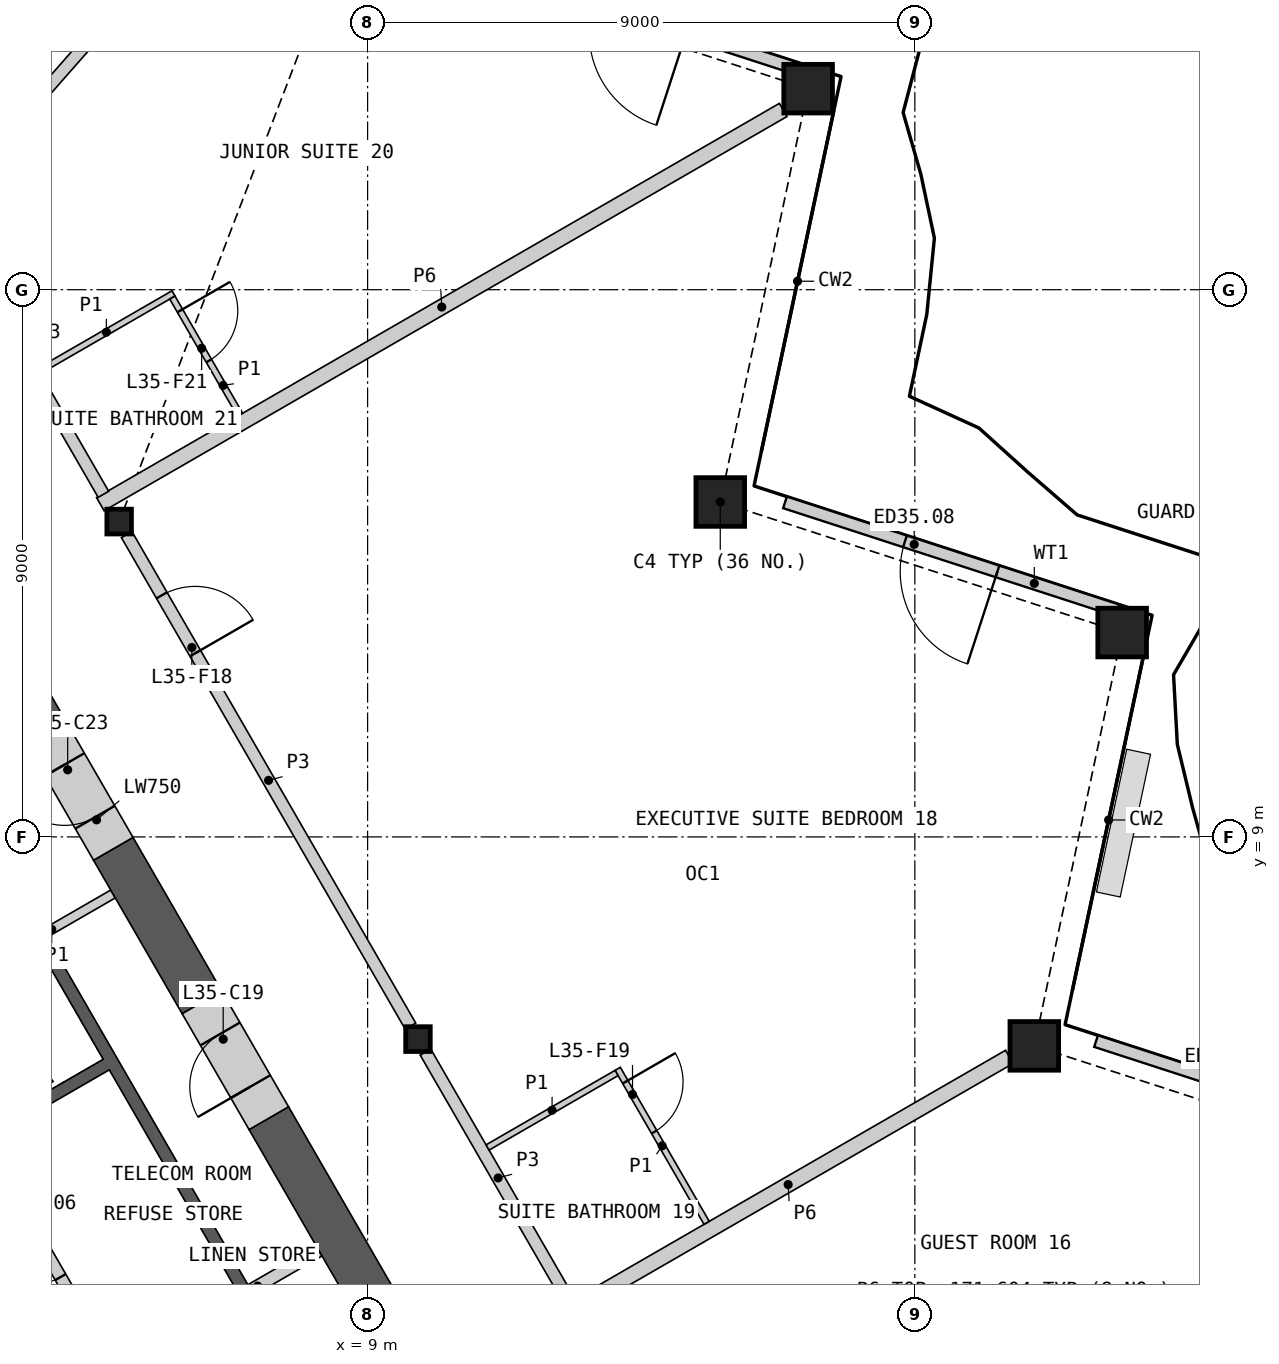
"""IFC4 building model, lengths in metres.
Left out: names, types, materials, properties, quantities, classifications, styles, units other than length and angle.
Written with IfcOpenShell. Run it as: python <this file> out.ifc"""

import sys

from ifc_helpers import new_model, si_unit, direction, frame, frame_2d, origin, origin_2d, place, context, subcontext, project, spatial, polyline, rectangle, hollow_rectangle, i_section, outline, extrude, element, fill, save


model = new_model("IFC4")
c1 = context("Model", 3, precision=1e-05, world=origin(), true_north=direction((0.0, 1.0)))
c2 = subcontext(c1, "Body", "Model", "MODEL_VIEW")
j1 = project(units=[si_unit("LENGTHUNIT", "METRE"), si_unit("PLANEANGLEUNIT", "RADIAN")], contexts=[c1])
p1 = place(None, origin())
s1 = spatial("IfcSite", under=j1, at=p1, CompositionType="ELEMENT")
p2 = place(p1, origin())
s2 = spatial("IfcBuilding", under=s1, at=p2, CompositionType="ELEMENT")
p3 = place(p2, frame((0.0, 0.0, 169.2)))
s3 = spatial("IfcBuildingStorey", under=s2, at=p3, CompositionType="ELEMENT", Elevation=169.2)
for number, where, z_axis, x_axis in (
    (1, (19.965, 5.563, 0.0), (0.0, 0.0, 1.0), (1.0, 0.0, 0.0)),
    (2, (21.409, 12.361, 0.0), (0.0, 0.0, 1.0), (1.0, 0.0, 0.0)),
    (3, (14.8, 14.508, 0.0), (0.0, 0.0, 1.0), (1.0, 0.0, 0.0)),
    (4, (16.245, 21.306, 0.0), (0.0, 0.0, 1.0), (1.0, 0.0, 0.0)),
):
    element("IfcColumn", number, at=place(p3, frame(where, z_axis=z_axis, x_axis=x_axis)), inside=s3, PredefinedType="COLUMN", context=c2, shape_type="SweptSolid", body=[
        extrude(hollow_rectangle(XDim=0.8, YDim=0.8, WallThickness=0.05, at=origin_2d()), origin(), (0.0, 0.0, 1.0), 3.6),
    ])
for number, where, z_axis, x_axis in (
    (5, (9.828, 5.675, 0.0), (0.0, 0.0, 1.0), (1.0, 0.0, 0.0)),
    (6, (4.914, 14.186, 0.0), (0.0, 0.0, 1.0), (1.0, 0.0, 0.0)),
):
    element("IfcColumn", number, at=place(p3, frame(where, z_axis=z_axis, x_axis=x_axis)), inside=s3, PredefinedType="COLUMN", context=c2, shape_type="SweptSolid", body=[
        extrude(i_section(OverallWidth=0.404, OverallDepth=0.407, WebThickness=0.027, FlangeThickness=0.044, at=origin_2d()), origin(), (0.0, 0.0, 1.0), 3.6),
    ])
p4 = place(p3, frame((26.447, 3.865, 0.0), z_axis=(0.0, 0.0, 1.0), x_axis=(-0.951043432761, 0.309057258453, 0.0)))
e7 = element("IfcWall", 7, at=p4, inside=s3, PredefinedType="SOLIDWALL", context=c2, shape_type="SweptSolid", body=[
    extrude(rectangle(XDim=5.748, YDim=0.2, at=frame_2d((2.874, 0.0))), origin(), (0.0, 0.0, 1.0), 2.701),
])
p5 = place(p4, frame((2.074, 0.0, 0.0)))
e8 = element("IfcOpeningElement", 8, at=p5, cuts=e7, PredefinedType="OPENING", context=c2, shape_type="SweptSolid", body=[
    extrude(rectangle(XDim=1.6, YDim=2.4, at=frame_2d((0.8, 1.2))), frame((0.0, 0.11, 0.0), z_axis=(0.0, -1.0, 0.0), x_axis=(1.0, 0.0, 0.0)), (0.0, 0.0, 1.0), 0.22),
])
p6 = place(p3, frame((21.331, 12.726, 0.0), z_axis=(0.0, 0.0, 1.0), x_axis=(-0.95105997304, 0.309006355405, 0.0)))
e9 = element("IfcWall", 9, at=p6, inside=s3, PredefinedType="SOLIDWALL", context=c2, shape_type="SweptSolid", body=[
    extrude(rectangle(XDim=5.748, YDim=0.2, at=frame_2d((2.874, 0.0))), origin(), (0.0, 0.0, 1.0), 2.701),
])
p7 = place(p6, frame((2.074, 0.0, 0.0)))
e10 = element("IfcOpeningElement", 10, at=p7, cuts=e9, PredefinedType="OPENING", context=c2, shape_type="SweptSolid", body=[
    extrude(rectangle(XDim=1.6, YDim=2.4, at=frame_2d((0.8, 1.2))), frame((0.0, 0.11, 0.0), z_axis=(0.0, -1.0, 0.0), x_axis=(1.0, 0.0, 0.0)), (0.0, 0.0, 1.0), 0.22),
])
p8 = place(p3, frame((16.216, 21.586, 0.0), z_axis=(0.0, 0.0, 1.0), x_axis=(-0.95105997304, 0.309006355405, 0.0)))
e11 = element("IfcWall", 11, at=p8, inside=s3, PredefinedType="SOLIDWALL", context=c2, shape_type="SweptSolid", body=[
    extrude(rectangle(XDim=5.748, YDim=0.2, at=frame_2d((2.874, 0.0))), origin(), (0.0, 0.0, 1.0), 2.701),
])
p9 = place(p8, frame((2.074, 0.0, 0.0)))
e12 = element("IfcOpeningElement", 12, at=p9, cuts=e11, PredefinedType="OPENING", context=c2, shape_type="SweptSolid", body=[
    extrude(rectangle(XDim=1.6, YDim=2.4, at=frame_2d((0.8, 1.2))), frame((0.0, 0.11, 0.0), z_axis=(0.0, -1.0, 0.0), x_axis=(1.0, 0.0, 0.0)), (0.0, 0.0, 1.0), 0.22),
])
p10 = place(p3, origin())
e13 = element("IfcWall", 13, at=p10, inside=s3, PredefinedType="SHEAR", context=c2, shape_type="SweptSolid", body=[
    extrude(outline(polyline([(1.561, 6.097), (3.731, 7.35), (7.131, 1.461), (4.96, 0.208), (4.861, 0.381), (6.852, 1.531), (4.752, 5.169), (2.76, 4.019), (2.66, 4.192), (4.652, 5.342), (3.652, 7.074), (1.66, 5.924), (1.561, 6.097)])), origin(), (0.0, 0.0, 1.0), 3.25),
])
p11 = place(p3, frame((5.817, -1.476, 0.0), z_axis=(0.0, 0.0, 1.0), x_axis=(-0.500002616675, 0.866023893041, 0.0)))
e14 = element("IfcWall", 14, at=p11, inside=s3, PredefinedType="SOLIDWALL", context=c2, shape_type="SweptSolid", body=[
    extrude(rectangle(XDim=8.373, YDim=0.2, at=frame_2d((4.187, 0.0))), origin(), (0.0, 0.0, 1.0), 3.25),
])
p12 = place(p11, frame((0.437, 0.0, 0.0)))
e15 = element("IfcOpeningElement", 15, at=p12, cuts=e14, PredefinedType="OPENING", context=c2, shape_type="SweptSolid", body=[
    extrude(rectangle(XDim=0.9, YDim=2.1, at=frame_2d((0.45, 1.05))), frame((0.0, 0.11, 0.0), z_axis=(0.0, -1.0, 0.0), x_axis=(1.0, 0.0, 0.0)), (0.0, 0.0, 1.0), 0.22),
])
p13 = place(p11, frame((3.737, 0.0, 0.0)))
e16 = element("IfcOpeningElement", 16, at=p13, cuts=e14, PredefinedType="OPENING", context=c2, shape_type="SweptSolid", body=[
    extrude(rectangle(XDim=0.9, YDim=2.1, at=frame_2d((0.45, 1.05))), frame((0.0, 0.11, 0.0), z_axis=(0.0, -1.0, 0.0), x_axis=(1.0, 0.0, 0.0)), (0.0, 0.0, 1.0), 0.22),
])
p14 = place(p11, frame((6.937, 0.0, 0.0)))
e17 = element("IfcOpeningElement", 17, at=p14, cuts=e14, PredefinedType="OPENING", context=c2, shape_type="SweptSolid", body=[
    extrude(rectangle(XDim=1.1, YDim=2.1, at=frame_2d((0.55, 1.05))), frame((0.0, 0.11, 0.0), z_axis=(0.0, -1.0, 0.0), x_axis=(1.0, 0.0, 0.0)), (0.0, 0.0, 1.0), 0.22),
])
p15 = place(p3, frame((7.081, 1.548, 0.0), z_axis=(0.0, 0.0, 1.0), x_axis=(0.866003189247, 0.500038474733, 0.0)))
e18 = element("IfcWall", 18, at=p15, inside=s3, PredefinedType="SHEAR", context=c2, shape_type="SweptSolid", body=[
    extrude(rectangle(XDim=1.293, YDim=0.2, at=frame_2d((0.646, 0.0))), origin(), (0.0, 0.0, 1.0), 3.25),
])
p16 = place(p3, frame((3.693, 7.415, 0.0), z_axis=(0.0, 0.0, 1.0), x_axis=(0.866003189247, 0.500038474733, 0.0)))
e19 = element("IfcWall", 19, at=p16, inside=s3, PredefinedType="PARTITIONING", context=c2, shape_type="SweptSolid", body=[
    extrude(rectangle(XDim=1.293, YDim=0.15, at=frame_2d((0.646, 0.0))), origin(), (0.0, 0.0, 1.0), 3.25),
])
p17 = place(p3, frame((14.526, -8.011, 0.0), z_axis=(0.0, 0.0, 1.0), x_axis=(-0.499994855372, 0.866028374016, 0.0)))
e20 = element("IfcWall", 20, at=p17, inside=s3, PredefinedType="SHEAR", context=c2, shape_type="SweptSolid", body=[
    extrude(rectangle(XDim=14.301, YDim=0.75, at=frame_2d((7.15, 0.0))), origin(), (0.0, 0.0, 1.0), 3.25),
])
p18 = place(p3, frame((6.275, 6.279, 0.0), z_axis=(0.0, 0.0, 1.0), x_axis=(-0.500029273391, 0.866008502124, 0.0)))
e21 = element("IfcWall", 21, at=p18, inside=s3, PredefinedType="SHEAR", context=c2, shape_type="SweptSolid", body=[
    extrude(rectangle(XDim=2.916, YDim=0.75, at=frame_2d((1.458, 0.0))), origin(), (0.0, 0.0, 1.0), 3.25),
])
p19 = place(p3, frame((3.717, 10.709, 0.0), z_axis=(0.0, 0.0, 1.0), x_axis=(-0.500005599468, 0.866022170906, 0.0)))
e22 = element("IfcWall", 22, at=p19, inside=s3, PredefinedType="SHEAR", context=c2, shape_type="SweptSolid", body=[
    extrude(rectangle(XDim=2.662, YDim=0.75, at=frame_2d((1.331, 0.0))), origin(), (0.0, 0.0, 1.0), 3.25),
])
p20 = place(p3, frame((7.375, 4.374, 0.0), z_axis=(0.0, 0.0, 1.0), x_axis=(-0.499946605688, 0.86605622881, 0.0)))
e23 = element("IfcWall", 23, at=p20, inside=s3, PredefinedType="SHEAR", context=c2, shape_type="SweptSolid", body=[
    extrude(rectangle(XDim=2.2, YDim=0.75, at=frame_2d((1.1, 0.0))), origin(), (0.0, 0.0, 1.0), 3.25),
])
p21 = place(p20, frame((0.6, 0.0, 0.0)))
e24 = element("IfcOpeningElement", 24, at=p21, cuts=e23, PredefinedType="OPENING", context=c2, shape_type="SweptSolid", body=[
    extrude(rectangle(XDim=1.0, YDim=2.1, at=frame_2d((0.5, 1.05))), frame((0.0, 0.385, 0.0), z_axis=(0.0, -1.0, 0.0), x_axis=(1.0, 0.0, 0.0)), (0.0, 0.0, 1.0), 0.77),
])
p22 = place(p3, frame((4.817, 8.804, 0.0), z_axis=(0.0, 0.0, 1.0), x_axis=(-0.50002983664, 0.866008176907, 0.0)))
e25 = element("IfcWall", 25, at=p22, inside=s3, PredefinedType="SHEAR", context=c2, shape_type="SweptSolid", body=[
    extrude(rectangle(XDim=2.2, YDim=0.75, at=frame_2d((1.1, 0.0))), origin(), (0.0, 0.0, 1.0), 3.25),
])
p23 = place(p22, frame((0.6, 0.0, 0.0)))
e26 = element("IfcOpeningElement", 26, at=p23, cuts=e25, PredefinedType="OPENING", context=c2, shape_type="SweptSolid", body=[
    extrude(rectangle(XDim=1.0, YDim=2.1, at=frame_2d((0.5, 1.05))), frame((0.0, 0.385, 0.0), z_axis=(0.0, -1.0, 0.0), x_axis=(1.0, 0.0, 0.0)), (0.0, 0.0, 1.0), 0.77),
])
p24 = place(p3, frame((14.836, -3.249, 0.0), z_axis=(0.0, 0.0, 1.0), x_axis=(0.866022412254, 0.500005181446, 0.0)))
e27 = element("IfcWall", 27, at=p24, inside=s3, PredefinedType="PARTITIONING", context=c2, shape_type="SweptSolid", body=[
    extrude(rectangle(XDim=13.081, YDim=0.25, at=frame_2d((6.541, 0.0))), origin(), (0.0, 0.0, 1.0), 2.404),
])
p25 = place(p3, frame((4.604, 14.473, 0.0), z_axis=(0.0, 0.0, 1.0), x_axis=(0.866029765546, 0.499992445131, 0.0)))
e28 = element("IfcWall", 28, at=p25, inside=s3, PredefinedType="PARTITIONING", context=c2, shape_type="SweptSolid", body=[
    extrude(rectangle(XDim=12.968, YDim=0.25, at=frame_2d((6.484, 0.0))), origin(), (0.0, 0.0, 1.0), 2.404),
])
p26 = place(p3, frame((5.038, 13.972, 0.0), z_axis=(0.0, 0.0, 1.0), x_axis=(0.50000393355, -0.866023132736, 0.0)))
e29 = element("IfcWall", 29, at=p26, inside=s3, PredefinedType="PARTITIONING", context=c2, shape_type="SweptSolid", body=[
    extrude(rectangle(XDim=9.335, YDim=0.2, at=frame_2d((4.667, 0.0))), origin(), (0.0, 0.0, 1.0), 3.25),
])
p27 = place(p26, frame((1.154, 0.0, 0.0)))
e30 = element("IfcOpeningElement", 30, at=p27, cuts=e29, PredefinedType="OPENING", context=c2, shape_type="SweptSolid", body=[
    extrude(rectangle(XDim=1.1, YDim=2.1, at=frame_2d((0.55, 1.05))), frame((0.0, 0.11, 0.0), z_axis=(0.0, -1.0, 0.0), x_axis=(1.0, 0.0, 0.0)), (0.0, 0.0, 1.0), 0.22),
])
p28 = place(p3, frame((12.278, 1.182, 0.0), z_axis=(0.0, 0.0, 1.0), x_axis=(0.866024457297, 0.500001639361, 0.0)))
e31 = element("IfcWall", 31, at=p28, inside=s3, PredefinedType="PARTITIONING", context=c2, shape_type="SweptSolid", body=[
    extrude(rectangle(XDim=8.402, YDim=0.25, at=frame_2d((4.201, 0.0))), origin(), (0.0, 0.0, 1.0), 2.404),
])
p29 = place(p3, frame((1.913, 19.385, 0.0), z_axis=(0.0, 0.0, 1.0), x_axis=(0.499988331988, -0.866032140209, 0.0)))
e32 = element("IfcWall", 32, at=p29, inside=s3, PredefinedType="PARTITIONING", context=c2, shape_type="SweptSolid", body=[
    extrude(rectangle(XDim=5.485, YDim=0.2, at=frame_2d((2.742, 0.0))), origin(), (0.0, 0.0, 1.0), 3.25),
])
p30 = place(p29, frame((0.352, 0.0, 0.0)))
e33 = element("IfcOpeningElement", 33, at=p30, cuts=e32, PredefinedType="OPENING", context=c2, shape_type="SweptSolid", body=[
    extrude(rectangle(XDim=1.1, YDim=2.1, at=frame_2d((0.55, 1.05))), frame((0.0, 0.11, 0.0), z_axis=(0.0, -1.0, 0.0), x_axis=(1.0, 0.0, 0.0)), (0.0, 0.0, 1.0), 0.22),
])
p31 = place(p3, frame((9.952, 5.461, 0.0), z_axis=(0.0, 0.0, 1.0), x_axis=(0.499990736708, -0.866030751883, 0.0)))
e34 = element("IfcWall", 34, at=p31, inside=s3, PredefinedType="PARTITIONING", context=c2, shape_type="SweptSolid", body=[
    extrude(rectangle(XDim=4.779, YDim=0.2, at=frame_2d((2.389, 0.0))), origin(), (0.0, 0.0, 1.0), 3.25),
])
p32 = place(p3, frame((2.029, 19.373, 0.0), z_axis=(0.0, 0.0, 1.0), x_axis=(0.66019067586, 0.751098043871, 0.0)))
e35 = element("IfcWall", 35, at=p32, inside=s3, PredefinedType="PARTITIONING", context=c2, shape_type="SweptSolid", body=[
    extrude(rectangle(XDim=13.938, YDim=0.2, at=frame_2d((6.969, 0.0))), origin(), (0.0, 0.0, 1.0), 2.404),
])
p33 = place(p3, frame((13.113, 5.186, 0.0), z_axis=(0.0, 0.0, 1.0), x_axis=(0.499963291492, -0.866046596414, 0.0)))
e36 = element("IfcWall", 36, at=p33, inside=s3, PredefinedType="PARTITIONING", context=c2, shape_type="SweptSolid", body=[
    extrude(rectangle(XDim=2.925, YDim=0.1, at=frame_2d((1.462, 0.0))), origin(), (0.0, 0.0, 1.0), 2.404),
])
p34 = place(p33, frame((0.25, 0.0, 0.0)))
e37 = element("IfcOpeningElement", 37, at=p34, cuts=e36, PredefinedType="OPENING", context=c2, shape_type="SweptSolid", body=[
    extrude(rectangle(XDim=0.95, YDim=2.1, at=frame_2d((0.475, 1.05))), frame((0.0, 0.06, 0.0), z_axis=(0.0, -1.0, 0.0), x_axis=(1.0, 0.0, 0.0)), (0.0, 0.0, 1.0), 0.12),
])
p35 = place(p3, frame((3.599, 16.664, 0.0), z_axis=(0.0, 0.0, 1.0), x_axis=(0.865989465428, 0.500062241894, 0.0)))
e38 = element("IfcWall", 38, at=p35, inside=s3, PredefinedType="PARTITIONING", context=c2, shape_type="SweptSolid", body=[
    extrude(rectangle(XDim=2.55, YDim=0.1, at=frame_2d((1.275, 0.0))), origin(), (0.0, 0.0, 1.0), 2.404),
])
p36 = place(p3, frame((10.973, 3.892, 0.0), z_axis=(0.0, 0.0, 1.0), x_axis=(0.866014668023, 0.500018594424, 0.0)))
e39 = element("IfcWall", 39, at=p36, inside=s3, PredefinedType="PARTITIONING", context=c2, shape_type="SweptSolid", body=[
    extrude(rectangle(XDim=2.45, YDim=0.1, at=frame_2d((1.225, 0.0))), origin(), (0.0, 0.0, 1.0), 2.404),
])
p37 = place(p3, frame((5.789, 17.87, 0.0), z_axis=(0.0, 0.0, 1.0), x_axis=(0.49999788721, -0.866026623601, 0.0)))
e40 = element("IfcWall", 40, at=p37, inside=s3, PredefinedType="PARTITIONING", context=c2, shape_type="SweptSolid", body=[
    extrude(rectangle(XDim=2.225, YDim=0.1, at=frame_2d((1.113, 0.0))), origin(), (0.0, 0.0, 1.0), 2.404),
])
p38 = place(p37, frame((0.25, 0.0, 0.0)))
e41 = element("IfcOpeningElement", 41, at=p38, cuts=e40, PredefinedType="OPENING", context=c2, shape_type="SweptSolid", body=[
    extrude(rectangle(XDim=0.95, YDim=2.1, at=frame_2d((0.475, 1.05))), frame((0.0, 0.06, 0.0), z_axis=(0.0, -1.0, 0.0), x_axis=(1.0, 0.0, 0.0)), (0.0, 0.0, 1.0), 0.12),
])
p39 = place(p7, origin())
e42 = element("IfcDoor", 42, at=p39, inside=s3, OperationType="DOUBLE_DOOR_SINGLE_SWING", PredefinedType="DOOR", context=c2, shape_type="SweptSolid", body=[
    extrude(rectangle(XDim=1.6, YDim=2.4, at=frame_2d((0.8, 1.2))), frame((0.0, 0.025, 0.0), z_axis=(0.0, -1.0, 0.0), x_axis=(1.0, 0.0, 0.0)), (0.0, 0.0, 1.0), 0.05),
])
fill(e10, e42)
p40 = place(p13, origin())
e43 = element("IfcDoor", 43, at=p40, inside=s3, OperationType="SINGLE_SWING_RIGHT", PredefinedType="DOOR", context=c2, shape_type="SweptSolid", body=[
    extrude(rectangle(XDim=0.9, YDim=2.1, at=frame_2d((0.45, 1.05))), frame((0.0, 0.025, 0.0), z_axis=(0.0, -1.0, 0.0), x_axis=(1.0, 0.0, 0.0)), (0.0, 0.0, 1.0), 0.05),
])
fill(e16, e43)
p41 = place(p21, origin())
e44 = element("IfcDoor", 44, at=p41, inside=s3, OperationType="SINGLE_SWING_LEFT", PredefinedType="DOOR", context=c2, shape_type="SweptSolid", body=[
    extrude(rectangle(XDim=1.0, YDim=2.1, at=frame_2d((0.5, 1.05))), frame((0.0, 0.13, 0.0), z_axis=(0.0, -1.0, 0.0), x_axis=(1.0, 0.0, 0.0)), (0.0, 0.0, 1.0), 0.05),
])
fill(e24, e44)
p42 = place(p23, origin())
e45 = element("IfcDoor", 45, at=p42, inside=s3, OperationType="SINGLE_SWING_RIGHT", PredefinedType="DOOR", context=c2, shape_type="SweptSolid", body=[
    extrude(rectangle(XDim=1.0, YDim=2.1, at=frame_2d((0.5, 1.05))), frame((0.0, 0.13, 0.0), z_axis=(0.0, -1.0, 0.0), x_axis=(1.0, 0.0, 0.0)), (0.0, 0.0, 1.0), 0.05),
])
fill(e26, e45)
p43 = place(p27, origin())
e46 = element("IfcDoor", 46, at=p43, inside=s3, OperationType="SINGLE_SWING_RIGHT", PredefinedType="DOOR", context=c2, shape_type="SweptSolid", body=[
    extrude(rectangle(XDim=1.1, YDim=2.1, at=frame_2d((0.55, 1.05))), frame((0.0, 0.025, 0.0), z_axis=(0.0, -1.0, 0.0), x_axis=(1.0, 0.0, 0.0)), (0.0, 0.0, 1.0), 0.05),
])
fill(e30, e46)
p44 = place(p34, origin())
e47 = element("IfcDoor", 47, at=p44, inside=s3, OperationType="SINGLE_SWING_LEFT", PredefinedType="DOOR", context=c2, shape_type="SweptSolid", body=[
    extrude(rectangle(XDim=0.95, YDim=2.1, at=frame_2d((0.475, 1.05))), frame((0.0, 0.025, 0.0), z_axis=(0.0, -1.0, 0.0), x_axis=(1.0, 0.0, 0.0)), (0.0, 0.0, 1.0), 0.05),
])
fill(e37, e47)
p45 = place(p38, origin())
e48 = element("IfcDoor", 48, at=p45, inside=s3, OperationType="SINGLE_SWING_LEFT", PredefinedType="DOOR", context=c2, shape_type="SweptSolid", body=[
    extrude(rectangle(XDim=0.95, YDim=2.1, at=frame_2d((0.475, 1.05))), frame((0.0, 0.025, 0.0), z_axis=(0.0, -1.0, 0.0), x_axis=(1.0, 0.0, 0.0)), (0.0, 0.0, 1.0), 0.05),
])
fill(e41, e48)
save(model, sys.argv[1])
